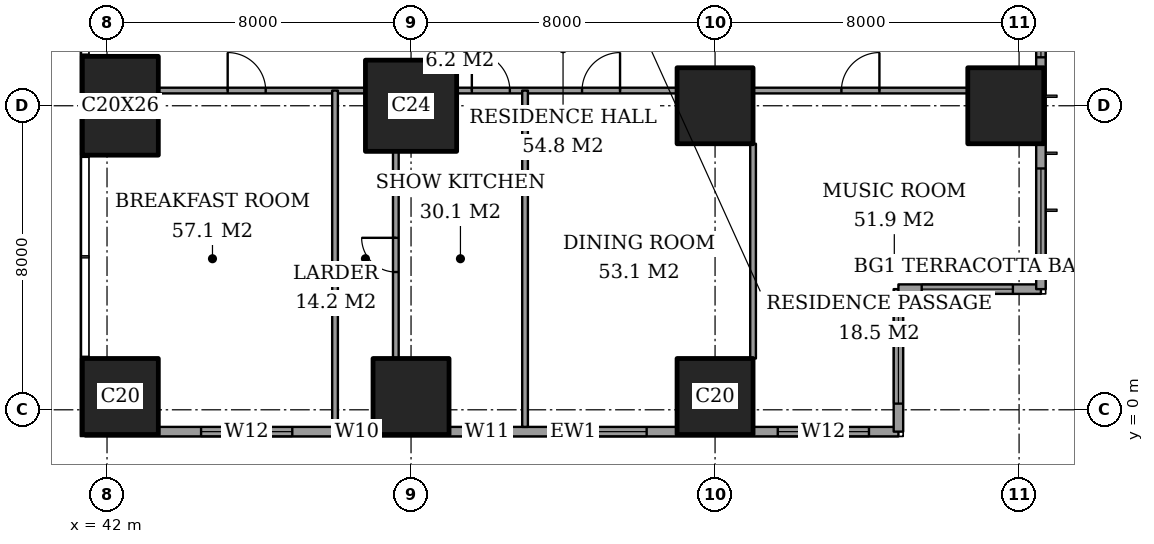
"""IFC4 building model, lengths in metres.
Left out: names, types, materials, properties, quantities, classifications, styles, units other than length and angle.
Written with IfcOpenShell. Run it as: python <this file> out.ifc"""

import sys

from ifc_helpers import new_model, si_unit, direction, frame, frame_2d, origin, origin_2d, place, context, subcontext, project, spatial, rectangle, extrude, element, fill, save


model = new_model("IFC4")
c1 = context("Model", 3, precision=1e-05, world=origin(), true_north=direction((0.0, 1.0)))
c2 = subcontext(c1, "Body", "Model", "MODEL_VIEW")
j1 = project(units=[si_unit("LENGTHUNIT", "METRE"), si_unit("PLANEANGLEUNIT", "RADIAN")], contexts=[c1])
p1 = place(None, origin())
s1 = spatial("IfcSite", under=j1, at=p1, CompositionType="ELEMENT")
p2 = place(p1, origin())
s2 = spatial("IfcBuilding", under=s1, at=p2, CompositionType="ELEMENT")
p3 = place(p2, frame((0.0, 0.0, 139.4)))
s3 = spatial("IfcBuildingStorey", under=s2, at=p3, CompositionType="ELEMENT", Elevation=139.4)
p4 = place(p3, frame((42.35, 0.35, 0.0), z_axis=(0.0, 0.0, 1.0), x_axis=(1.0, 0.0, 0.0)))
e1 = element("IfcColumn", 1, at=p4, inside=s3, PredefinedType="COLUMN", context=c2, shape_type="SweptSolid", body=[
    extrude(rectangle(XDim=2.0, YDim=2.0, at=origin_2d()), origin(), (0.0, 0.0, 1.0), 3.6),
])
p5 = place(p3, frame((42.35, 8.0, 0.0), z_axis=(0.0, 0.0, 1.0), x_axis=(1.0, 0.0, 0.0)))
e2 = element("IfcColumn", 2, at=p5, inside=s3, PredefinedType="COLUMN", context=c2, shape_type="SweptSolid", body=[
    extrude(rectangle(XDim=2.0, YDim=2.6, at=origin_2d()), origin(), (0.0, 0.0, 1.0), 3.6),
])
p6 = place(p3, frame((50.0, 0.35, 0.0), z_axis=(0.0, 0.0, 1.0), x_axis=(1.0, 0.0, 0.0)))
e3 = element("IfcColumn", 3, at=p6, inside=s3, PredefinedType="COLUMN", context=c2, shape_type="SweptSolid", body=[
    extrude(rectangle(XDim=2.0, YDim=2.0, at=origin_2d()), origin(), (0.0, 0.0, 1.0), 3.6),
])
p7 = place(p3, frame((50.0, 8.0, 0.0), z_axis=(0.0, 0.0, 1.0), x_axis=(1.0, 0.0, 0.0)))
e4 = element("IfcColumn", 4, at=p7, inside=s3, PredefinedType="COLUMN", context=c2, shape_type="SweptSolid", body=[
    extrude(rectangle(XDim=2.4, YDim=2.4, at=origin_2d()), origin(), (0.0, 0.0, 1.0), 3.6),
])
for number, where, z_axis, x_axis in (
    (5, (58.0, 0.35, 0.0), (0.0, 0.0, 1.0), (1.0, 0.0, 0.0)),
    (6, (58.0, 8.0, 0.0), (0.0, 0.0, 1.0), (1.0, 0.0, 0.0)),
    (7, (65.65, 8.0, 0.0), (0.0, 0.0, 1.0), (1.0, 0.0, 0.0)),
):
    element("IfcColumn", number, at=place(p3, frame(where, z_axis=z_axis, x_axis=x_axis)), inside=s3, PredefinedType="COLUMN", context=c2, shape_type="SweptSolid", body=[
        extrude(rectangle(XDim=2.0, YDim=2.0, at=origin_2d()), origin(), (0.0, 0.0, 1.0), 3.6),
    ])
p8 = place(p3, frame((41.425, -0.575, 0.0), z_axis=(0.0, 0.0, 1.0), x_axis=(1.0, 0.0, 0.0)))
e8 = element("IfcWall", 8, at=p8, inside=s3, PredefinedType="SOLIDWALL", context=c2, shape_type="SweptSolid", body=[
    extrude(rectangle(XDim=21.4, YDim=0.25, at=frame_2d((10.7, 0.0))), origin(), (0.0, 0.0, 1.0), 3.6),
])
p9 = place(p8, frame((3.05, 0.0, 0.4)))
e9 = element("IfcOpeningElement", 9, at=p9, cuts=e8, PredefinedType="OPENING", context=c2, shape_type="SweptSolid", body=[
    extrude(rectangle(XDim=2.4, YDim=2.2, at=frame_2d((1.2, 1.1))), frame((0.0, 0.135, 0.0), z_axis=(0.0, -1.0, 0.0), x_axis=(1.0, 0.0, 0.0)), (0.0, 0.0, 1.0), 0.27),
])
p10 = place(p8, frame((6.85, 0.0, 0.4)))
e10 = element("IfcOpeningElement", 10, at=p10, cuts=e8, PredefinedType="OPENING", context=c2, shape_type="SweptSolid", body=[
    extrude(rectangle(XDim=0.6, YDim=2.2, at=frame_2d((0.3, 1.1))), frame((0.0, 0.135, 0.0), z_axis=(0.0, -1.0, 0.0), x_axis=(1.0, 0.0, 0.0)), (0.0, 0.0, 1.0), 0.27),
])
p11 = place(p8, frame((9.975, 0.0, 0.4)))
e11 = element("IfcOpeningElement", 11, at=p11, cuts=e8, PredefinedType="OPENING", context=c2, shape_type="SweptSolid", body=[
    extrude(rectangle(XDim=1.2, YDim=2.2, at=frame_2d((0.6, 1.1))), frame((0.0, 0.135, 0.0), z_axis=(0.0, -1.0, 0.0), x_axis=(1.0, 0.0, 0.0)), (0.0, 0.0, 1.0), 0.27),
])
p12 = place(p8, frame((12.375, 0.0, 0.4)))
e12 = element("IfcOpeningElement", 12, at=p12, cuts=e8, PredefinedType="OPENING", context=c2, shape_type="SweptSolid", body=[
    extrude(rectangle(XDim=2.4, YDim=2.2, at=frame_2d((1.2, 1.1))), frame((0.0, 0.135, 0.0), z_axis=(0.0, -1.0, 0.0), x_axis=(1.0, 0.0, 0.0)), (0.0, 0.0, 1.0), 0.27),
])
p13 = place(p8, frame((18.225, 0.0, 0.4)))
e13 = element("IfcOpeningElement", 13, at=p13, cuts=e8, PredefinedType="OPENING", context=c2, shape_type="SweptSolid", body=[
    extrude(rectangle(XDim=2.4, YDim=2.2, at=frame_2d((1.2, 1.1))), frame((0.0, 0.135, 0.0), z_axis=(0.0, -1.0, 0.0), x_axis=(1.0, 0.0, 0.0)), (0.0, 0.0, 1.0), 0.27),
])
p14 = place(p3, frame((62.825, -0.575, 0.0), z_axis=(0.0, 0.0, 1.0), x_axis=(0.0, 1.0, 0.0)))
e14 = element("IfcWall", 14, at=p14, inside=s3, PredefinedType="SOLIDWALL", context=c2, shape_type="SweptSolid", body=[
    extrude(rectangle(XDim=3.75, YDim=0.25, at=frame_2d((1.875, 0.0))), origin(), (0.0, 0.0, 1.0), 3.6),
])
p15 = place(p14, frame((0.738, 0.0, 0.4)))
e15 = element("IfcOpeningElement", 15, at=p15, cuts=e14, PredefinedType="OPENING", context=c2, shape_type="SweptSolid", body=[
    extrude(rectangle(XDim=2.4, YDim=2.2, at=frame_2d((1.2, 1.1))), frame((0.0, 0.135, 0.0), z_axis=(0.0, -1.0, 0.0), x_axis=(1.0, 0.0, 0.0)), (0.0, 0.0, 1.0), 0.27),
])
p16 = place(p3, frame((62.825, 3.175, 0.0), z_axis=(0.0, 0.0, 1.0), x_axis=(1.0, 0.0, 0.0)))
e16 = element("IfcWall", 16, at=p16, inside=s3, PredefinedType="SOLIDWALL", context=c2, shape_type="SweptSolid", body=[
    extrude(rectangle(XDim=3.75, YDim=0.25, at=frame_2d((1.875, 0.0))), origin(), (0.0, 0.0, 1.0), 3.6),
])
p17 = place(p16, frame((0.613, 0.0, 0.4)))
e17 = element("IfcOpeningElement", 17, at=p17, cuts=e16, PredefinedType="OPENING", context=c2, shape_type="SweptSolid", body=[
    extrude(rectangle(XDim=2.4, YDim=2.2, at=frame_2d((1.2, 1.1))), frame((0.0, 0.135, 0.0), z_axis=(0.0, -1.0, 0.0), x_axis=(1.0, 0.0, 0.0)), (0.0, 0.0, 1.0), 0.27),
])
p18 = place(p3, frame((66.575, 3.175, 0.0), z_axis=(0.0, 0.0, 1.0), x_axis=(0.0, 1.0, 0.0)))
e18 = element("IfcWall", 18, at=p18, inside=s3, PredefinedType="SOLIDWALL", context=c2, shape_type="SweptSolid", body=[
    extrude(rectangle(XDim=41.65, YDim=0.25, at=frame_2d((20.825, 0.0))), origin(), (0.0, 0.0, 1.0), 3.6),
])
p19 = place(p18, frame((0.775, 0.0, 0.4)))
e19 = element("IfcOpeningElement", 19, at=p19, cuts=e18, PredefinedType="OPENING", context=c2, shape_type="SweptSolid", body=[
    extrude(rectangle(XDim=2.4, YDim=2.2, at=frame_2d((1.2, 1.1))), frame((0.0, 0.135, 0.0), z_axis=(0.0, -1.0, 0.0), x_axis=(1.0, 0.0, 0.0)), (0.0, 0.0, 1.0), 0.27),
])
p20 = place(p18, frame((6.1, 0.0, 0.4)))
e20 = element("IfcOpeningElement", 20, at=p20, cuts=e18, PredefinedType="OPENING", context=c2, shape_type="SweptSolid", body=[
    extrude(rectangle(XDim=1.2, YDim=2.2, at=frame_2d((0.6, 1.1))), frame((0.0, 0.135, 0.0), z_axis=(0.0, -1.0, 0.0), x_axis=(1.0, 0.0, 0.0)), (0.0, 0.0, 1.0), 0.27),
])
p21 = place(p18, frame((8.275, 0.0, 0.4)))
e21 = element("IfcOpeningElement", 21, at=p21, cuts=e18, PredefinedType="OPENING", context=c2, shape_type="SweptSolid", body=[
    extrude(rectangle(XDim=2.4, YDim=2.2, at=frame_2d((1.2, 1.1))), frame((0.0, 0.135, 0.0), z_axis=(0.0, -1.0, 0.0), x_axis=(1.0, 0.0, 0.0)), (0.0, 0.0, 1.0), 0.27),
])
p22 = place(p18, frame((15.775, 0.0, 0.4)))
e22 = element("IfcOpeningElement", 22, at=p22, cuts=e18, PredefinedType="OPENING", context=c2, shape_type="SweptSolid", body=[
    extrude(rectangle(XDim=2.4, YDim=2.2, at=frame_2d((1.2, 1.1))), frame((0.0, 0.135, 0.0), z_axis=(0.0, -1.0, 0.0), x_axis=(1.0, 0.0, 0.0)), (0.0, 0.0, 1.0), 0.27),
])
p23 = place(p18, frame((23.475, 0.0, 0.4)))
e23 = element("IfcOpeningElement", 23, at=p23, cuts=e18, PredefinedType="OPENING", context=c2, shape_type="SweptSolid", body=[
    extrude(rectangle(XDim=2.4, YDim=2.2, at=frame_2d((1.2, 1.1))), frame((0.0, 0.135, 0.0), z_axis=(0.0, -1.0, 0.0), x_axis=(1.0, 0.0, 0.0)), (0.0, 0.0, 1.0), 0.27),
])
p24 = place(p18, frame((30.975, 0.0, 0.4)))
e24 = element("IfcOpeningElement", 24, at=p24, cuts=e18, PredefinedType="OPENING", context=c2, shape_type="SweptSolid", body=[
    extrude(rectangle(XDim=2.4, YDim=2.2, at=frame_2d((1.2, 1.1))), frame((0.0, 0.135, 0.0), z_axis=(0.0, -1.0, 0.0), x_axis=(1.0, 0.0, 0.0)), (0.0, 0.0, 1.0), 0.27),
])
p25 = place(p18, frame((34.5, 0.0, 0.4)))
e25 = element("IfcOpeningElement", 25, at=p25, cuts=e18, PredefinedType="OPENING", context=c2, shape_type="SweptSolid", body=[
    extrude(rectangle(XDim=1.2, YDim=2.2, at=frame_2d((0.6, 1.1))), frame((0.0, 0.135, 0.0), z_axis=(0.0, -1.0, 0.0), x_axis=(1.0, 0.0, 0.0)), (0.0, 0.0, 1.0), 0.27),
])
p26 = place(p18, frame((38.475, 0.0, 0.4)))
e26 = element("IfcOpeningElement", 26, at=p26, cuts=e18, PredefinedType="OPENING", context=c2, shape_type="SweptSolid", body=[
    extrude(rectangle(XDim=2.4, YDim=2.2, at=frame_2d((1.2, 1.1))), frame((0.0, 0.135, 0.0), z_axis=(0.0, -1.0, 0.0), x_axis=(1.0, 0.0, 0.0)), (0.0, 0.0, 1.0), 0.27),
])
p27 = place(p3, frame((43.35, 8.4, 0.0), z_axis=(0.0, 0.0, 1.0), x_axis=(1.0, 0.0, 0.0)))
e27 = element("IfcWall", 27, at=p27, inside=s3, PredefinedType="PARTITIONING", context=c2, shape_type="SweptSolid", body=[
    extrude(rectangle(XDim=5.45, YDim=0.15, at=frame_2d((2.725, 0.0))), origin(), (0.0, 0.0, 1.0), 3.35),
])
p28 = place(p27, frame((1.825, 0.0, 0.0)))
e28 = element("IfcOpeningElement", 28, at=p28, cuts=e27, PredefinedType="OPENING", context=c2, shape_type="SweptSolid", body=[
    extrude(rectangle(XDim=1.0, YDim=2.1, at=frame_2d((0.5, 1.05))), frame((0.0, 0.085, 0.0), z_axis=(0.0, -1.0, 0.0), x_axis=(1.0, 0.0, 0.0)), (0.0, 0.0, 1.0), 0.17),
])
p29 = place(p3, frame((51.2, 8.4, 0.0), z_axis=(0.0, 0.0, 1.0), x_axis=(1.0, 0.0, 0.0)))
e29 = element("IfcWall", 29, at=p29, inside=s3, PredefinedType="PARTITIONING", context=c2, shape_type="SweptSolid", body=[
    extrude(rectangle(XDim=5.8, YDim=0.15, at=frame_2d((2.9, 0.0))), origin(), (0.0, 0.0, 1.0), 3.35),
])
p30 = place(p29, frame((3.3, 0.0, 0.0)))
e30 = element("IfcOpeningElement", 30, at=p30, cuts=e29, PredefinedType="OPENING", context=c2, shape_type="SweptSolid", body=[
    extrude(rectangle(XDim=1.0, YDim=2.1, at=frame_2d((0.5, 1.05))), frame((0.0, 0.085, 0.0), z_axis=(0.0, -1.0, 0.0), x_axis=(1.0, 0.0, 0.0)), (0.0, 0.0, 1.0), 0.17),
])
p31 = place(p29, frame((0.4, 0.0, 0.0)))
e31 = element("IfcOpeningElement", 31, at=p31, cuts=e29, PredefinedType="OPENING", context=c2, shape_type="SweptSolid", body=[
    extrude(rectangle(XDim=1.0, YDim=2.1, at=frame_2d((0.5, 1.05))), frame((0.0, 0.085, 0.0), z_axis=(0.0, -1.0, 0.0), x_axis=(1.0, 0.0, 0.0)), (0.0, 0.0, 1.0), 0.17),
])
p32 = place(p3, frame((59.0, 8.4, 0.0), z_axis=(0.0, 0.0, 1.0), x_axis=(1.0, 0.0, 0.0)))
e32 = element("IfcWall", 32, at=p32, inside=s3, PredefinedType="PARTITIONING", context=c2, shape_type="SweptSolid", body=[
    extrude(rectangle(XDim=5.65, YDim=0.15, at=frame_2d((2.825, 0.0))), origin(), (0.0, 0.0, 1.0), 3.35),
])
p33 = place(p32, frame((2.325, 0.0, 0.0)))
e33 = element("IfcOpeningElement", 33, at=p33, cuts=e32, PredefinedType="OPENING", context=c2, shape_type="SweptSolid", body=[
    extrude(rectangle(XDim=1.0, YDim=2.1, at=frame_2d((0.5, 1.05))), frame((0.0, 0.085, 0.0), z_axis=(0.0, -1.0, 0.0), x_axis=(1.0, 0.0, 0.0)), (0.0, 0.0, 1.0), 0.17),
])
p34 = place(p3, frame((48.0, -0.45, 0.0), z_axis=(0.0, 0.0, 1.0), x_axis=(0.0, 1.0, 0.0)))
e34 = element("IfcWall", 34, at=p34, inside=s3, PredefinedType="PARTITIONING", context=c2, shape_type="SweptSolid", body=[
    extrude(rectangle(XDim=8.85, YDim=0.15, at=frame_2d((4.425, 0.0))), origin(), (0.0, 0.0, 1.0), 3.35),
])
p35 = place(p3, frame((49.6, 1.35, 0.0), z_axis=(0.0, 0.0, 1.0), x_axis=(0.0, 1.0, 0.0)))
e35 = element("IfcWall", 35, at=p35, inside=s3, PredefinedType="PARTITIONING", context=c2, shape_type="SweptSolid", body=[
    extrude(rectangle(XDim=5.45, YDim=0.15, at=frame_2d((2.725, 0.0))), origin(), (0.0, 0.0, 1.0), 3.35),
])
p36 = place(p35, frame((2.275, 0.0, 0.0)))
e36 = element("IfcOpeningElement", 36, at=p36, cuts=e35, PredefinedType="OPENING", context=c2, shape_type="SweptSolid", body=[
    extrude(rectangle(XDim=0.9, YDim=2.1, at=frame_2d((0.45, 1.05))), frame((0.0, 0.085, 0.0), z_axis=(0.0, -1.0, 0.0), x_axis=(1.0, 0.0, 0.0)), (0.0, 0.0, 1.0), 0.17),
])
p37 = place(p3, frame((53.0, -0.45, 0.0), z_axis=(0.0, 0.0, 1.0), x_axis=(0.0, 1.0, 0.0)))
e37 = element("IfcWall", 37, at=p37, inside=s3, PredefinedType="PARTITIONING", context=c2, shape_type="SweptSolid", body=[
    extrude(rectangle(XDim=8.85, YDim=0.15, at=frame_2d((4.425, 0.0))), origin(), (0.0, 0.0, 1.0), 3.35),
])
p38 = place(p3, frame((59.0, 1.35, 0.0), z_axis=(0.0, 0.0, 1.0), x_axis=(0.0, 1.0, 0.0)))
e38 = element("IfcWall", 38, at=p38, inside=s3, PredefinedType="PARTITIONING", context=c2, shape_type="SweptSolid", body=[
    extrude(rectangle(XDim=5.65, YDim=0.15, at=frame_2d((2.825, 0.0))), origin(), (0.0, 0.0, 1.0), 3.35),
])
p39 = place(p9, origin())
e39 = element("IfcWindow", 39, at=p39, inside=s3, PartitioningType="SINGLE_PANEL", PredefinedType="WINDOW", context=c2, shape_type="SweptSolid", body=[
    extrude(rectangle(XDim=2.4, YDim=2.2, at=frame_2d((1.2, 1.1))), frame((0.0, 0.03, 0.0), z_axis=(0.0, -1.0, 0.0), x_axis=(1.0, 0.0, 0.0)), (0.0, 0.0, 1.0), 0.06),
])
fill(e9, e39)
p40 = place(p10, origin())
e40 = element("IfcWindow", 40, at=p40, inside=s3, PartitioningType="SINGLE_PANEL", PredefinedType="WINDOW", context=c2, shape_type="SweptSolid", body=[
    extrude(rectangle(XDim=0.6, YDim=2.2, at=frame_2d((0.3, 1.1))), frame((0.0, 0.03, 0.0), z_axis=(0.0, -1.0, 0.0), x_axis=(1.0, 0.0, 0.0)), (0.0, 0.0, 1.0), 0.06),
])
fill(e10, e40)
p41 = place(p11, origin())
e41 = element("IfcWindow", 41, at=p41, inside=s3, PartitioningType="SINGLE_PANEL", PredefinedType="WINDOW", context=c2, shape_type="SweptSolid", body=[
    extrude(rectangle(XDim=1.2, YDim=2.2, at=frame_2d((0.6, 1.1))), frame((0.0, 0.03, 0.0), z_axis=(0.0, -1.0, 0.0), x_axis=(1.0, 0.0, 0.0)), (0.0, 0.0, 1.0), 0.06),
])
fill(e11, e41)
p42 = place(p12, origin())
e42 = element("IfcWindow", 42, at=p42, inside=s3, PartitioningType="SINGLE_PANEL", PredefinedType="WINDOW", context=c2, shape_type="SweptSolid", body=[
    extrude(rectangle(XDim=2.4, YDim=2.2, at=frame_2d((1.2, 1.1))), frame((0.0, 0.03, 0.0), z_axis=(0.0, -1.0, 0.0), x_axis=(1.0, 0.0, 0.0)), (0.0, 0.0, 1.0), 0.06),
])
fill(e12, e42)
p43 = place(p13, origin())
e43 = element("IfcWindow", 43, at=p43, inside=s3, PartitioningType="SINGLE_PANEL", PredefinedType="WINDOW", context=c2, shape_type="SweptSolid", body=[
    extrude(rectangle(XDim=2.4, YDim=2.2, at=frame_2d((1.2, 1.1))), frame((0.0, 0.03, 0.0), z_axis=(0.0, -1.0, 0.0), x_axis=(1.0, 0.0, 0.0)), (0.0, 0.0, 1.0), 0.06),
])
fill(e13, e43)
p44 = place(p15, origin())
e44 = element("IfcWindow", 44, at=p44, inside=s3, PartitioningType="SINGLE_PANEL", PredefinedType="WINDOW", context=c2, shape_type="SweptSolid", body=[
    extrude(rectangle(XDim=2.4, YDim=2.2, at=frame_2d((1.2, 1.1))), frame((0.0, 0.03, 0.0), z_axis=(0.0, -1.0, 0.0), x_axis=(1.0, 0.0, 0.0)), (0.0, 0.0, 1.0), 0.06),
])
fill(e15, e44)
p45 = place(p17, origin())
e45 = element("IfcWindow", 45, at=p45, inside=s3, PartitioningType="SINGLE_PANEL", PredefinedType="WINDOW", context=c2, shape_type="SweptSolid", body=[
    extrude(rectangle(XDim=2.4, YDim=2.2, at=frame_2d((1.2, 1.1))), frame((0.0, 0.03, 0.0), z_axis=(0.0, -1.0, 0.0), x_axis=(1.0, 0.0, 0.0)), (0.0, 0.0, 1.0), 0.06),
])
fill(e17, e45)
p46 = place(p19, origin())
e46 = element("IfcWindow", 46, at=p46, inside=s3, PartitioningType="SINGLE_PANEL", PredefinedType="WINDOW", context=c2, shape_type="SweptSolid", body=[
    extrude(rectangle(XDim=2.4, YDim=2.2, at=frame_2d((1.2, 1.1))), frame((0.0, 0.03, 0.0), z_axis=(0.0, -1.0, 0.0), x_axis=(1.0, 0.0, 0.0)), (0.0, 0.0, 1.0), 0.06),
])
fill(e19, e46)
p47 = place(p20, origin())
e47 = element("IfcWindow", 47, at=p47, inside=s3, PartitioningType="SINGLE_PANEL", PredefinedType="WINDOW", context=c2, shape_type="SweptSolid", body=[
    extrude(rectangle(XDim=1.2, YDim=2.2, at=frame_2d((0.6, 1.1))), frame((0.0, 0.03, 0.0), z_axis=(0.0, -1.0, 0.0), x_axis=(1.0, 0.0, 0.0)), (0.0, 0.0, 1.0), 0.06),
])
fill(e20, e47)
p48 = place(p33, origin())
e48 = element("IfcDoor", 48, at=p48, inside=s3, OperationType="SINGLE_SWING_LEFT", PredefinedType="DOOR", context=c2, shape_type="SweptSolid", body=[
    extrude(rectangle(XDim=1.0, YDim=2.1, at=frame_2d((0.5, 1.05))), frame((0.0, 0.025, 0.0), z_axis=(0.0, -1.0, 0.0), x_axis=(1.0, 0.0, 0.0)), (0.0, 0.0, 1.0), 0.05),
])
fill(e33, e48)
p49 = place(p30, origin())
e49 = element("IfcDoor", 49, at=p49, inside=s3, OperationType="SINGLE_SWING_LEFT", PredefinedType="DOOR", context=c2, shape_type="SweptSolid", body=[
    extrude(rectangle(XDim=1.0, YDim=2.1, at=frame_2d((0.5, 1.05))), frame((0.0, 0.025, 0.0), z_axis=(0.0, -1.0, 0.0), x_axis=(1.0, 0.0, 0.0)), (0.0, 0.0, 1.0), 0.05),
])
fill(e30, e49)
p50 = place(p31, origin())
e50 = element("IfcDoor", 50, at=p50, inside=s3, OperationType="SINGLE_SWING_RIGHT", PredefinedType="DOOR", context=c2, shape_type="SweptSolid", body=[
    extrude(rectangle(XDim=1.0, YDim=2.1, at=frame_2d((0.5, 1.05))), frame((0.0, 0.025, 0.0), z_axis=(0.0, -1.0, 0.0), x_axis=(1.0, 0.0, 0.0)), (0.0, 0.0, 1.0), 0.05),
])
fill(e31, e50)
p51 = place(p36, origin())
e51 = element("IfcDoor", 51, at=p51, inside=s3, OperationType="SINGLE_SWING_LEFT", PredefinedType="DOOR", context=c2, shape_type="SweptSolid", body=[
    extrude(rectangle(XDim=0.9, YDim=2.1, at=frame_2d((0.45, 1.05))), frame((0.0, 0.025, 0.0), z_axis=(0.0, -1.0, 0.0), x_axis=(1.0, 0.0, 0.0)), (0.0, 0.0, 1.0), 0.05),
])
fill(e36, e51)
p52 = place(p28, origin())
e52 = element("IfcDoor", 52, at=p52, inside=s3, OperationType="SINGLE_SWING_RIGHT", PredefinedType="DOOR", context=c2, shape_type="SweptSolid", body=[
    extrude(rectangle(XDim=1.0, YDim=2.1, at=frame_2d((0.5, 1.05))), frame((0.0, 0.025, 0.0), z_axis=(0.0, -1.0, 0.0), x_axis=(1.0, 0.0, 0.0)), (0.0, 0.0, 1.0), 0.05),
])
fill(e28, e52)
save(model, sys.argv[1])
